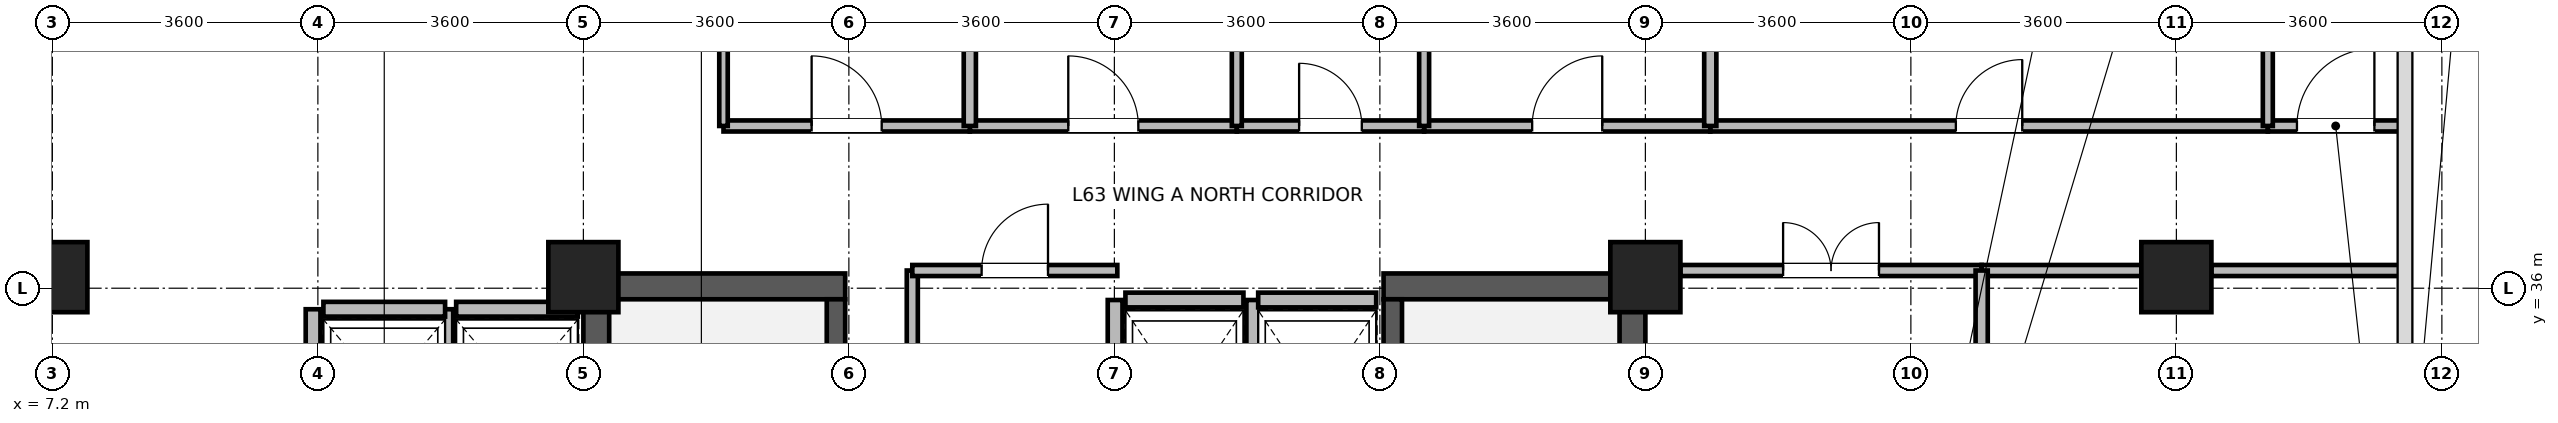
"""IFC4 building model, lengths in metres.
Left out: names, types, materials, properties, quantities, classifications, styles, units other than length and angle.
Written with IfcOpenShell. Run it as: python <this file> out.ifc"""

import sys

from ifc_helpers import new_model, si_unit, direction, frame, frame_2d, origin, origin_2d, place, context, subcontext, project, spatial, rectangle, extrude, source, transform, mapped, element, fill, save


model = new_model("IFC4")
c1 = context("Model", 3, precision=1e-05, world=origin(), true_north=direction((0.0, 1.0)))
c2 = subcontext(c1, "Body", "Model", "MODEL_VIEW")
j1 = project(units=[si_unit("LENGTHUNIT", "METRE"), si_unit("PLANEANGLEUNIT", "RADIAN")], contexts=[c1])
p1 = place(None, origin())
s1 = spatial("IfcSite", under=j1, at=p1, CompositionType="ELEMENT")
p2 = place(p1, origin())
s2 = spatial("IfcBuilding", under=s1, at=p2, CompositionType="ELEMENT")
p3 = place(p2, frame((0.0, 0.0, 246.2)))
s3 = spatial("IfcBuildingStorey", under=s2, at=p3, CompositionType="ELEMENT", Elevation=246.2)
for number, where, z_axis, x_axis in (
    (1, (14.575, 28.5, 0.0), (0.0, 0.0, 1.0), (0.0, 1.0, 0.0)),
    (2, (28.625, 28.5, 0.0), (0.0, 0.0, 1.0), (0.0, 1.0, 0.0)),
):
    element("IfcWall", number, at=place(p3, frame(where, z_axis=z_axis, x_axis=x_axis)), inside=s3, PredefinedType="SHEAR", context=c2, shape_type="SweptSolid", body=[
        extrude(rectangle(XDim=7.7, YDim=0.35, at=frame_2d((3.85, 0.0))), origin(), (0.0, 0.0, 1.0), 3.28),
    ])
for number, where, z_axis, x_axis in (
    (3, (14.75, 36.025, 0.0), (0.0, 0.0, 1.0), (1.0, 0.0, 0.0)),
    (4, (25.25, 36.025, 0.0), (0.0, 0.0, 1.0), (1.0, 0.0, 0.0)),
):
    element("IfcWall", number, at=place(p3, frame(where, z_axis=z_axis, x_axis=x_axis)), inside=s3, PredefinedType="SHEAR", context=c2, shape_type="SweptSolid", body=[
        extrude(rectangle(XDim=3.2, YDim=0.35, at=frame_2d((1.6, 0.0))), origin(), (0.0, 0.0, 1.0), 3.28),
    ])
p4 = place(p3, frame((17.825, 28.85, 0.0), z_axis=(0.0, 0.0, 1.0), x_axis=(0.0, 1.0, 0.0)))
e5 = element("IfcWall", 5, at=p4, inside=s3, PredefinedType="SHEAR", context=c2, shape_type="SweptSolid", body=[
    extrude(rectangle(XDim=7.0, YDim=0.25, at=frame_2d((3.5, 0.0))), origin(), (0.0, 0.0, 1.0), 3.28),
])
p5 = place(p4, frame((0.15, 0.0, 0.0)))
e6 = element("IfcOpeningElement", 6, at=p5, cuts=e5, PredefinedType="OPENING", context=c2, shape_type="SweptSolid", body=[
    extrude(rectangle(XDim=1.1, YDim=2.08, at=frame_2d((0.55, 1.04))), frame((0.0, 0.135, 0.0), z_axis=(0.0, -1.0, 0.0), x_axis=(1.0, 0.0, 0.0)), (0.0, 0.0, 1.0), 0.27),
])
p6 = place(p3, frame((25.375, 28.85, 0.0), z_axis=(0.0, 0.0, 1.0), x_axis=(0.0, 1.0, 0.0)))
e7 = element("IfcWall", 7, at=p6, inside=s3, PredefinedType="SHEAR", context=c2, shape_type="SweptSolid", body=[
    extrude(rectangle(XDim=7.0, YDim=0.25, at=frame_2d((3.5, 0.0))), origin(), (0.0, 0.0, 1.0), 3.28),
])
p7 = place(p6, frame((0.15, 0.0, 0.0)))
e8 = element("IfcOpeningElement", 8, at=p7, cuts=e7, PredefinedType="OPENING", context=c2, shape_type="SweptSolid", body=[
    extrude(rectangle(XDim=1.1, YDim=2.08, at=frame_2d((0.55, 1.04))), frame((0.0, 0.135, 0.0), z_axis=(0.0, -1.0, 0.0), x_axis=(1.0, 0.0, 0.0)), (0.0, 0.0, 1.0), 0.27),
])
m1 = source(origin(), c2, "Body", "SweptSolid", [
    extrude(rectangle(XDim=0.95, YDim=0.95, at=origin_2d()), origin(), (0.0, 0.0, 1.0), 3.7),
])
for number, where, z_axis, x_axis in (
    (9, (7.2, 36.15, 0.0), (0.0, 0.0, 1.0), (1.0, 0.0, 0.0)),
    (10, (14.4, 36.15, 0.0), (0.0, 0.0, 1.0), (1.0, 0.0, 0.0)),
    (11, (28.8, 36.15, 0.0), (0.0, 0.0, 1.0), (1.0, 0.0, 0.0)),
    (12, (36.0, 36.15, 0.0), (0.0, 0.0, 1.0), (1.0, 0.0, 0.0)),
):
    element("IfcColumn", number, at=place(p3, frame(where, z_axis=z_axis, x_axis=x_axis)), inside=s3, PredefinedType="COLUMN", context=c2, shape_type="MappedRepresentation", body=[
        mapped(m1, transform((0.0, 0.0, 0.0), x_axis=(1.0, 0.0, 0.0), y_axis=(0.0, 1.0, 0.0), z_axis=(0.0, 0.0, 1.0), scale=1.0)),
    ])
p8 = place(p3, frame((12.675, 35.715, 0.0), z_axis=(0.0, 0.0, 1.0), x_axis=(1.0, 0.0, 0.0)))
e13 = element("IfcWall", 13, at=p8, inside=s3, PredefinedType="PARTITIONING", context=c2, shape_type="SweptSolid", body=[
    extrude(rectangle(XDim=1.65, YDim=0.2, at=frame_2d((0.825, 0.0))), origin(), (0.0, 0.0, 1.0), 1.46),
])
p9 = place(p3, frame((12.535, 33.485, 0.0), z_axis=(0.0, 0.0, 1.0), x_axis=(0.0, 1.0, 0.0)))
e14 = element("IfcWall", 14, at=p9, inside=s3, PredefinedType="PARTITIONING", context=c2, shape_type="SweptSolid", body=[
    extrude(rectangle(XDim=2.23, YDim=0.2, at=frame_2d((1.115, 0.0))), origin(), (0.0, 0.0, 1.0), 3.26),
])
p10 = place(p3, frame((10.875, 35.715, 0.0), z_axis=(0.0, 0.0, 1.0), x_axis=(1.0, 0.0, 0.0)))
e15 = element("IfcWall", 15, at=p10, inside=s3, PredefinedType="PARTITIONING", context=c2, shape_type="SweptSolid", body=[
    extrude(rectangle(XDim=1.65, YDim=0.2, at=frame_2d((0.825, 0.0))), origin(), (0.0, 0.0, 1.0), 1.46),
])
p11 = place(p3, frame((10.735, 33.485, 0.0), z_axis=(0.0, 0.0, 1.0), x_axis=(0.0, 1.0, 0.0)))
e16 = element("IfcWall", 16, at=p11, inside=s3, PredefinedType="PARTITIONING", context=c2, shape_type="SweptSolid", body=[
    extrude(rectangle(XDim=2.23, YDim=0.2, at=frame_2d((1.115, 0.0))), origin(), (0.0, 0.0, 1.0), 3.26),
])
p12 = place(p3, frame((21.75, 35.84, 0.0), z_axis=(0.0, 0.0, 1.0), x_axis=(1.0, 0.0, 0.0)))
e17 = element("IfcWall", 17, at=p12, inside=s3, PredefinedType="PARTITIONING", context=c2, shape_type="SweptSolid", body=[
    extrude(rectangle(XDim=1.6, YDim=0.2, at=frame_2d((0.8, 0.0))), origin(), (0.0, 0.0, 1.0), 2.36),
])
for number, where, z_axis, x_axis in (
    (18, (21.61, 33.16, 0.0), (0.0, 0.0, 1.0), (0.0, 1.0, 0.0)),
    (19, (23.49, 33.16, 0.0), (0.0, 0.0, 1.0), (0.0, 1.0, 0.0)),
):
    element("IfcWall", number, at=place(p3, frame(where, z_axis=z_axis, x_axis=x_axis)), inside=s3, PredefinedType="PARTITIONING", context=c2, shape_type="SweptSolid", body=[
        extrude(rectangle(XDim=2.68, YDim=0.2, at=frame_2d((1.34, 0.0))), origin(), (0.0, 0.0, 1.0), 3.26),
    ])
p13 = place(p3, frame((23.55, 35.84, 0.0), z_axis=(0.0, 0.0, 1.0), x_axis=(1.0, 0.0, 0.0)))
e20 = element("IfcWall", 20, at=p13, inside=s3, PredefinedType="PARTITIONING", context=c2, shape_type="SweptSolid", body=[
    extrude(rectangle(XDim=1.6, YDim=0.2, at=frame_2d((0.8, 0.0))), origin(), (0.0, 0.0, 1.0), 2.36),
])
p14 = place(p3, frame((29.68, 38.2, 0.0), z_axis=(0.0, 0.0, 1.0), x_axis=(1.0, 0.0, 0.0)))
e21 = element("IfcWall", 21, at=p14, inside=s3, PredefinedType="PARTITIONING", context=c2, shape_type="SweptSolid", body=[
    extrude(rectangle(XDim=7.56, YDim=0.15, at=frame_2d((3.78, 0.0))), origin(), (0.0, 0.0, 1.0), 3.26),
])
p15 = place(p14, frame((3.33, 0.0, 0.0)))
e22 = element("IfcOpeningElement", 22, at=p15, cuts=e21, PredefinedType="OPENING", context=c2, shape_type="SweptSolid", body=[
    extrude(rectangle(XDim=0.9, YDim=2.08, at=frame_2d((0.45, 1.04))), frame((0.0, 0.085, 0.0), z_axis=(0.0, -1.0, 0.0), x_axis=(1.0, 0.0, 0.0)), (0.0, 0.0, 1.0), 0.17),
])
p16 = place(p3, frame((33.36, 36.24, 0.0), z_axis=(0.0, 0.0, 1.0), x_axis=(1.0, 0.0, 0.0)))
e23 = element("IfcWall", 23, at=p16, inside=s3, PredefinedType="PARTITIONING", context=c2, shape_type="SweptSolid", body=[
    extrude(rectangle(XDim=2.165, YDim=0.15, at=frame_2d((1.083, 0.0))), origin(), (0.0, 0.0, 1.0), 2.71),
])
p17 = place(p3, frame((36.475, 36.24, 0.0), z_axis=(0.0, 0.0, 1.0), x_axis=(1.0, 0.0, 0.0)))
e24 = element("IfcWall", 24, at=p17, inside=s3, PredefinedType="PARTITIONING", context=c2, shape_type="SweptSolid", body=[
    extrude(rectangle(XDim=2.605, YDim=0.15, at=frame_2d((1.302, 0.0))), origin(), (0.0, 0.0, 1.0), 2.46),
])
p18 = place(p3, frame((29.275, 36.24, 0.0), z_axis=(0.0, 0.0, 1.0), x_axis=(1.0, 0.0, 0.0)))
e25 = element("IfcWall", 25, at=p18, inside=s3, PredefinedType="PARTITIONING", context=c2, shape_type="SweptSolid", body=[
    extrude(rectangle(XDim=4.085, YDim=0.15, at=frame_2d((2.042, 0.0))), origin(), (0.0, 0.0, 1.0), 2.71),
])
p19 = place(p18, frame((1.393, 0.0, 0.0)))
e26 = element("IfcOpeningElement", 26, at=p19, cuts=e25, PredefinedType="OPENING", context=c2, shape_type="SweptSolid", body=[
    extrude(rectangle(XDim=1.3, YDim=2.12, at=frame_2d((0.65, 1.06))), frame((0.0, 0.085, 0.0), z_axis=(0.0, -1.0, 0.0), x_axis=(1.0, 0.0, 0.0)), (0.0, 0.0, 1.0), 0.17),
])
p20 = place(p3, frame((25.8, 38.2, 0.0), z_axis=(0.0, 0.0, 1.0), x_axis=(1.0, 0.0, 0.0)))
e27 = element("IfcWall", 27, at=p20, inside=s3, PredefinedType="PARTITIONING", context=c2, shape_type="SweptSolid", body=[
    extrude(rectangle(XDim=3.88, YDim=0.15, at=frame_2d((1.94, 0.0))), origin(), (0.0, 0.0, 1.0), 3.26),
])
p21 = place(p20, frame((1.465, 0.0, 0.0)))
e28 = element("IfcOpeningElement", 28, at=p21, cuts=e27, PredefinedType="OPENING", context=c2, shape_type="SweptSolid", body=[
    extrude(rectangle(XDim=0.95, YDim=2.1, at=frame_2d((0.475, 1.05))), frame((0.0, 0.085, 0.0), z_axis=(0.0, -1.0, 0.0), x_axis=(1.0, 0.0, 0.0)), (0.0, 0.0, 1.0), 0.17),
])
p22 = place(p3, frame((19.64, 38.2, 0.0), z_axis=(0.0, 0.0, 1.0), x_axis=(1.0, 0.0, 0.0)))
e29 = element("IfcWall", 29, at=p22, inside=s3, PredefinedType="PARTITIONING", context=c2, shape_type="SweptSolid", body=[
    extrude(rectangle(XDim=3.62, YDim=0.15, at=frame_2d((1.81, 0.0))), origin(), (0.0, 0.0, 1.0), 3.26),
])
p23 = place(p22, frame((1.335, 0.0, 0.0)))
e30 = element("IfcOpeningElement", 30, at=p23, cuts=e29, PredefinedType="OPENING", context=c2, shape_type="SweptSolid", body=[
    extrude(rectangle(XDim=0.95, YDim=2.1, at=frame_2d((0.475, 1.05))), frame((0.0, 0.085, 0.0), z_axis=(0.0, -1.0, 0.0), x_axis=(1.0, 0.0, 0.0)), (0.0, 0.0, 1.0), 0.17),
])
p24 = place(p3, frame((16.3, 38.2, 0.0), z_axis=(0.0, 0.0, 1.0), x_axis=(1.0, 0.0, 0.0)))
e31 = element("IfcWall", 31, at=p24, inside=s3, PredefinedType="PARTITIONING", context=c2, shape_type="SweptSolid", body=[
    extrude(rectangle(XDim=3.34, YDim=0.15, at=frame_2d((1.67, 0.0))), origin(), (0.0, 0.0, 1.0), 3.26),
])
p25 = place(p24, frame((1.195, 0.0, 0.0)))
e32 = element("IfcOpeningElement", 32, at=p25, cuts=e31, PredefinedType="OPENING", context=c2, shape_type="SweptSolid", body=[
    extrude(rectangle(XDim=0.95, YDim=2.1, at=frame_2d((0.475, 1.05))), frame((0.0, 0.085, 0.0), z_axis=(0.0, -1.0, 0.0), x_axis=(1.0, 0.0, 0.0)), (0.0, 0.0, 1.0), 0.17),
])
p26 = place(p3, frame((18.86, 33.36, 0.0), z_axis=(0.0, 0.0, 1.0), x_axis=(0.0, 1.0, 0.0)))
e33 = element("IfcWall", 33, at=p26, inside=s3, PredefinedType="PARTITIONING", context=c2, shape_type="SweptSolid", body=[
    extrude(rectangle(XDim=2.88, YDim=0.15, at=frame_2d((1.44, 0.0))), origin(), (0.0, 0.0, 1.0), 3.26),
])
p27 = place(p3, frame((18.86, 36.24, 0.0), z_axis=(0.0, 0.0, 1.0), x_axis=(1.0, 0.0, 0.0)))
e34 = element("IfcWall", 34, at=p27, inside=s3, PredefinedType="PARTITIONING", context=c2, shape_type="SweptSolid", body=[
    extrude(rectangle(XDim=2.78, YDim=0.15, at=frame_2d((1.39, 0.0))), origin(), (0.0, 0.0, 1.0), 2.36),
])
p28 = place(p27, frame((0.94, 0.0, 0.0)))
e35 = element("IfcOpeningElement", 35, at=p28, cuts=e34, PredefinedType="OPENING", context=c2, shape_type="SweptSolid", body=[
    extrude(rectangle(XDim=0.9, YDim=2.08, at=frame_2d((0.45, 1.04))), frame((0.0, 0.085, 0.0), z_axis=(0.0, -1.0, 0.0), x_axis=(1.0, 0.0, 0.0)), (0.0, 0.0, 1.0), 0.17),
])
p29 = place(p3, frame((23.26, 38.2, 0.0), z_axis=(0.0, 0.0, 1.0), x_axis=(1.0, 0.0, 0.0)))
e36 = element("IfcWall", 36, at=p29, inside=s3, PredefinedType="PARTITIONING", context=c2, shape_type="SweptSolid", body=[
    extrude(rectangle(XDim=2.54, YDim=0.15, at=frame_2d((1.27, 0.0))), origin(), (0.0, 0.0, 1.0), 3.26),
])
p30 = place(p29, frame((0.845, 0.0, 0.0)))
e37 = element("IfcOpeningElement", 37, at=p30, cuts=e36, PredefinedType="OPENING", context=c2, shape_type="SweptSolid", body=[
    extrude(rectangle(XDim=0.85, YDim=2.04, at=frame_2d((0.425, 1.02))), frame((0.0, 0.085, 0.0), z_axis=(0.0, -1.0, 0.0), x_axis=(1.0, 0.0, 0.0)), (0.0, 0.0, 1.0), 0.17),
])
p31 = place(p3, frame((37.24, 38.2, 0.0), z_axis=(0.0, 0.0, 1.0), x_axis=(1.0, 0.0, 0.0)))
e38 = element("IfcWall", 38, at=p31, inside=s3, PredefinedType="PARTITIONING", context=c2, shape_type="SweptSolid", body=[
    extrude(rectangle(XDim=1.84, YDim=0.15, at=frame_2d((0.92, 0.0))), origin(), (0.0, 0.0, 1.0), 3.26),
])
p32 = place(p31, frame((0.395, 0.0, 0.0)))
e39 = element("IfcOpeningElement", 39, at=p32, cuts=e38, PredefinedType="OPENING", context=c2, shape_type="SweptSolid", body=[
    extrude(rectangle(XDim=1.05, YDim=2.12, at=frame_2d((0.525, 1.06))), frame((0.0, 0.085, 0.0), z_axis=(0.0, -1.0, 0.0), x_axis=(1.0, 0.0, 0.0)), (0.0, 0.0, 1.0), 0.17),
])
p33 = place(p3, frame((16.3, 38.2, 0.0), z_axis=(0.0, 0.0, 1.0), x_axis=(0.0, 1.0, 0.0)))
e40 = element("IfcWall", 40, at=p33, inside=s3, PredefinedType="PARTITIONING", context=c2, shape_type="SweptSolid", body=[
    extrude(rectangle(XDim=1.268, YDim=0.115, at=frame_2d((0.634, 0.0))), origin(), (0.0, 0.0, 1.0), 3.26),
])
p34 = place(p3, frame((19.64, 38.2, 0.0), z_axis=(0.0, 0.0, 1.0), x_axis=(0.0, 1.0, 0.0)))
e41 = element("IfcWall", 41, at=p34, inside=s3, PredefinedType="PARTITIONING", context=c2, shape_type="SweptSolid", body=[
    extrude(rectangle(XDim=4.868, YDim=0.165, at=frame_2d((2.434, 0.0))), origin(), (0.0, 0.0, 1.0), 3.26),
])
for number, where, z_axis, x_axis in (
    (42, (23.26, 38.2, 0.0), (0.0, 0.0, 1.0), (0.0, 1.0, 0.0)),
    (43, (25.8, 38.2, 0.0), (0.0, 0.0, 1.0), (0.0, 1.0, 0.0)),
):
    element("IfcWall", number, at=place(p3, frame(where, z_axis=z_axis, x_axis=x_axis)), inside=s3, PredefinedType="PARTITIONING", context=c2, shape_type="SweptSolid", body=[
        extrude(rectangle(XDim=4.868, YDim=0.135, at=frame_2d((2.434, 0.0))), origin(), (0.0, 0.0, 1.0), 3.26),
    ])
p35 = place(p3, frame((29.68, 38.2, 0.0), z_axis=(0.0, 0.0, 1.0), x_axis=(0.0, 1.0, 0.0)))
e44 = element("IfcWall", 44, at=p35, inside=s3, PredefinedType="PARTITIONING", context=c2, shape_type="SweptSolid", body=[
    extrude(rectangle(XDim=4.868, YDim=0.165, at=frame_2d((2.434, 0.0))), origin(), (0.0, 0.0, 1.0), 3.26),
])
p36 = place(p3, frame((37.24, 38.2, 0.0), z_axis=(0.0, 0.0, 1.0), x_axis=(0.0, 1.0, 0.0)))
e45 = element("IfcWall", 45, at=p36, inside=s3, PredefinedType="PARTITIONING", context=c2, shape_type="SweptSolid", body=[
    extrude(rectangle(XDim=4.868, YDim=0.135, at=frame_2d((2.434, 0.0))), origin(), (0.0, 0.0, 1.0), 3.26),
])
p37 = place(p3, frame((33.36, 31.64, 0.0), z_axis=(0.0, 0.0, 1.0), x_axis=(0.0, 1.0, 0.0)))
e46 = element("IfcWall", 46, at=p37, inside=s3, PredefinedType="PARTITIONING", context=c2, shape_type="SweptSolid", body=[
    extrude(rectangle(XDim=4.6, YDim=0.165, at=frame_2d((2.3, 0.0))), origin(), (0.0, 0.0, 1.0), 3.26),
])
p38 = place(p15, origin())
e47 = element("IfcDoor", 47, at=p38, inside=s3, OperationType="SINGLE_SWING_RIGHT", PredefinedType="DOOR", context=c2, shape_type="SweptSolid", body=[
    extrude(rectangle(XDim=0.9, YDim=2.08, at=frame_2d((0.45, 1.04))), frame((0.0, 0.025, 0.0), z_axis=(0.0, -1.0, 0.0), x_axis=(1.0, 0.0, 0.0)), (0.0, 0.0, 1.0), 0.05),
])
fill(e22, e47)
p39 = place(p19, origin())
e48 = element("IfcDoor", 48, at=p39, inside=s3, OperationType="DOUBLE_DOOR_SINGLE_SWING", PredefinedType="DOOR", context=c2, shape_type="SweptSolid", body=[
    extrude(rectangle(XDim=1.3, YDim=2.12, at=frame_2d((0.65, 1.06))), frame((0.0, 0.025, 0.0), z_axis=(0.0, -1.0, 0.0), x_axis=(1.0, 0.0, 0.0)), (0.0, 0.0, 1.0), 0.05),
])
fill(e26, e48)
p40 = place(p21, origin())
e49 = element("IfcDoor", 49, at=p40, inside=s3, OperationType="SINGLE_SWING_RIGHT", PredefinedType="DOOR", context=c2, shape_type="SweptSolid", body=[
    extrude(rectangle(XDim=0.95, YDim=2.1, at=frame_2d((0.475, 1.05))), frame((0.0, 0.025, 0.0), z_axis=(0.0, -1.0, 0.0), x_axis=(1.0, 0.0, 0.0)), (0.0, 0.0, 1.0), 0.05),
])
fill(e28, e49)
p41 = place(p23, origin())
e50 = element("IfcDoor", 50, at=p41, inside=s3, OperationType="SINGLE_SWING_LEFT", PredefinedType="DOOR", context=c2, shape_type="SweptSolid", body=[
    extrude(rectangle(XDim=0.95, YDim=2.1, at=frame_2d((0.475, 1.05))), frame((0.0, 0.025, 0.0), z_axis=(0.0, -1.0, 0.0), x_axis=(1.0, 0.0, 0.0)), (0.0, 0.0, 1.0), 0.05),
])
fill(e30, e50)
p42 = place(p25, origin())
e51 = element("IfcDoor", 51, at=p42, inside=s3, OperationType="SINGLE_SWING_LEFT", PredefinedType="DOOR", context=c2, shape_type="SweptSolid", body=[
    extrude(rectangle(XDim=0.95, YDim=2.1, at=frame_2d((0.475, 1.05))), frame((0.0, 0.025, 0.0), z_axis=(0.0, -1.0, 0.0), x_axis=(1.0, 0.0, 0.0)), (0.0, 0.0, 1.0), 0.05),
])
fill(e32, e51)
p43 = place(p28, origin())
e52 = element("IfcDoor", 52, at=p43, inside=s3, OperationType="SINGLE_SWING_RIGHT", PredefinedType="DOOR", context=c2, shape_type="SweptSolid", body=[
    extrude(rectangle(XDim=0.9, YDim=2.08, at=frame_2d((0.45, 1.04))), frame((0.0, 0.025, 0.0), z_axis=(0.0, -1.0, 0.0), x_axis=(1.0, 0.0, 0.0)), (0.0, 0.0, 1.0), 0.05),
])
fill(e35, e52)
p44 = place(p30, origin())
e53 = element("IfcDoor", 53, at=p44, inside=s3, OperationType="SINGLE_SWING_LEFT", PredefinedType="DOOR", context=c2, shape_type="SweptSolid", body=[
    extrude(rectangle(XDim=0.85, YDim=2.04, at=frame_2d((0.425, 1.02))), frame((0.0, 0.025, 0.0), z_axis=(0.0, -1.0, 0.0), x_axis=(1.0, 0.0, 0.0)), (0.0, 0.0, 1.0), 0.05),
])
fill(e37, e53)
p45 = place(p32, origin())
e54 = element("IfcDoor", 54, at=p45, inside=s3, OperationType="SINGLE_SWING_RIGHT", PredefinedType="DOOR", context=c2, shape_type="SweptSolid", body=[
    extrude(rectangle(XDim=1.05, YDim=2.12, at=frame_2d((0.525, 1.06))), frame((0.0, 0.025, 0.0), z_axis=(0.0, -1.0, 0.0), x_axis=(1.0, 0.0, 0.0)), (0.0, 0.0, 1.0), 0.05),
])
fill(e39, e54)
save(model, sys.argv[1])
